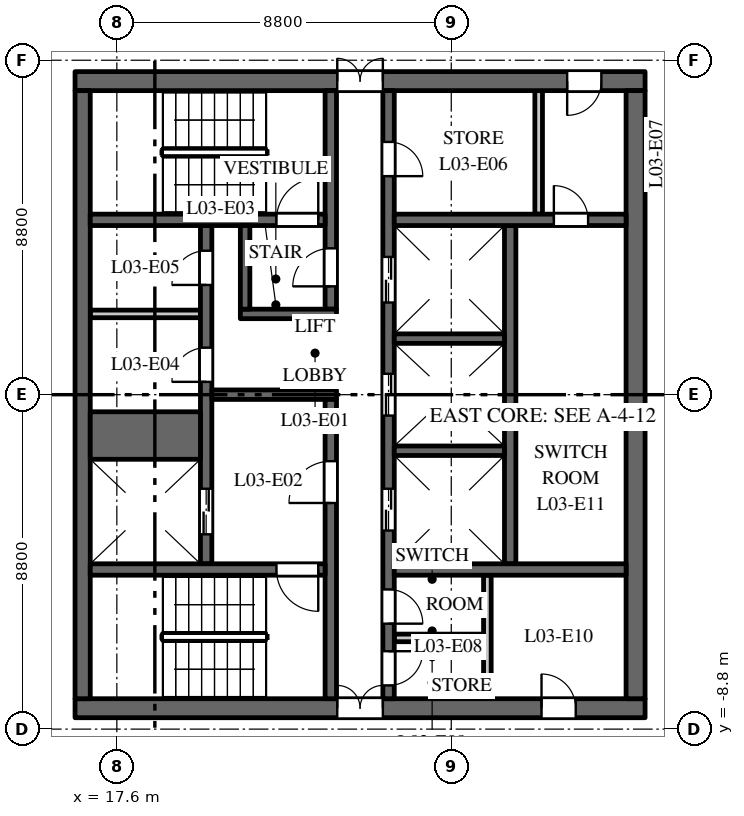
"""IFC4 building model, lengths in metres.
Left out: names, types, materials, properties, quantities, classifications, styles, units other than length and angle.
Written with IfcOpenShell. Run it as: python <this file> out.ifc"""

import sys

from ifc_helpers import new_model, si_unit, direction, frame, frame_2d, origin, place, context, subcontext, project, spatial, rectangle, extrude, element, fill, save


model = new_model("IFC4")
c1 = context("Model", 3, precision=1e-05, world=origin(), true_north=direction((0.0, 1.0)))
c2 = subcontext(c1, "Body", "Model", "MODEL_VIEW")
j1 = project(units=[si_unit("LENGTHUNIT", "METRE"), si_unit("PLANEANGLEUNIT", "RADIAN")], contexts=[c1])
p1 = place(None, origin())
s1 = spatial("IfcSite", under=j1, at=p1, CompositionType="ELEMENT")
p2 = place(p1, origin())
s2 = spatial("IfcBuilding", under=s1, at=p2, CompositionType="ELEMENT")
p3 = place(p2, frame((0.0, 0.0, 19.5)))
s3 = spatial("IfcBuildingStorey", under=s2, at=p3, CompositionType="ELEMENT", Elevation=19.5)
p4 = place(p3, frame((16.5, 8.25, 0.0), z_axis=(0.0, 0.0, 1.0), x_axis=(1.0, 0.0, 0.0)))
e1 = element("IfcWall", 1, at=p4, inside=s3, PredefinedType="SHEAR", context=c2, shape_type="SweptSolid", body=[
    extrude(rectangle(XDim=15.0, YDim=0.5, at=frame_2d((7.5, 0.0))), origin(), (0.0, 0.0, 1.0), 5.25),
])
p5 = place(p4, frame((6.9, 0.0, 0.0)))
e2 = element("IfcOpeningElement", 2, at=p5, cuts=e1, PredefinedType="OPENING", context=c2, shape_type="SweptSolid", body=[
    extrude(rectangle(XDim=1.2, YDim=2.1, at=frame_2d((0.6, 1.05))), frame((0.0, 0.26, 0.0), z_axis=(0.0, -1.0, 0.0), x_axis=(1.0, 0.0, 0.0)), (0.0, 0.0, 1.0), 0.52),
])
p6 = place(p4, frame((12.95, 0.0, 0.0)))
e3 = element("IfcOpeningElement", 3, at=p6, cuts=e1, PredefinedType="OPENING", context=c2, shape_type="SweptSolid", body=[
    extrude(rectangle(XDim=0.9, YDim=2.1, at=frame_2d((0.45, 1.05))), frame((0.0, 0.26, 0.0), z_axis=(0.0, -1.0, 0.0), x_axis=(1.0, 0.0, 0.0)), (0.0, 0.0, 1.0), 0.52),
])
p7 = place(p3, frame((16.5, -8.25, 0.0), z_axis=(0.0, 0.0, 1.0), x_axis=(1.0, 0.0, 0.0)))
e4 = element("IfcWall", 4, at=p7, inside=s3, PredefinedType="SHEAR", context=c2, shape_type="SweptSolid", body=[
    extrude(rectangle(XDim=15.0, YDim=0.5, at=frame_2d((7.5, 0.0))), origin(), (0.0, 0.0, 1.0), 5.25),
])
p8 = place(p7, frame((6.9, 0.0, 0.0)))
e5 = element("IfcOpeningElement", 5, at=p8, cuts=e4, PredefinedType="OPENING", context=c2, shape_type="SweptSolid", body=[
    extrude(rectangle(XDim=1.2, YDim=2.1, at=frame_2d((0.6, 1.05))), frame((0.0, 0.26, 0.0), z_axis=(0.0, -1.0, 0.0), x_axis=(1.0, 0.0, 0.0)), (0.0, 0.0, 1.0), 0.52),
])
p9 = place(p7, frame((12.275, 0.0, 0.0)))
e6 = element("IfcOpeningElement", 6, at=p9, cuts=e4, PredefinedType="OPENING", context=c2, shape_type="SweptSolid", body=[
    extrude(rectangle(XDim=0.9, YDim=2.1, at=frame_2d((0.45, 1.05))), frame((0.0, 0.26, 0.0), z_axis=(0.0, -1.0, 0.0), x_axis=(1.0, 0.0, 0.0)), (0.0, 0.0, 1.0), 0.52),
])
p10 = place(p3, frame((16.9, 2.125, 0.0), z_axis=(0.0, 0.0, 1.0), x_axis=(1.0, 0.0, 0.0)))
e7 = element("IfcWall", 7, at=p10, inside=s3, PredefinedType="PARTITIONING", context=c2, shape_type="SweptSolid", body=[
    extrude(rectangle(XDim=2.9, YDim=0.2, at=frame_2d((1.45, 0.0))), origin(), (0.0, 0.0, 1.0), 5.25),
])
p11 = place(p3, frame((27.95, -4.45, 0.0), z_axis=(0.0, 0.0, 1.0), x_axis=(0.0, 1.0, 0.0)))
e8 = element("IfcWall", 8, at=p11, inside=s3, PredefinedType="SHEAR", context=c2, shape_type="SweptSolid", body=[
    extrude(rectangle(XDim=8.9, YDim=0.3, at=frame_2d((4.45, 0.0))), origin(), (0.0, 0.0, 1.0), 5.25),
])
p12 = place(p3, frame((19.95, -4.45, 0.0), z_axis=(0.0, 0.0, 1.0), x_axis=(0.0, 1.0, 0.0)))
e9 = element("IfcWall", 9, at=p12, inside=s3, PredefinedType="SHEAR", context=c2, shape_type="SweptSolid", body=[
    extrude(rectangle(XDim=8.9, YDim=0.3, at=frame_2d((4.45, 0.0))), origin(), (0.0, 0.0, 1.0), 5.25),
])
p13 = place(p12, frame((0.775, 0.0, 0.0)))
e10 = element("IfcOpeningElement", 10, at=p13, cuts=e9, PredefinedType="OPENING", context=c2, shape_type="SweptSolid", body=[
    extrude(rectangle(XDim=1.2, YDim=2.1, at=frame_2d((0.6, 1.05))), frame((0.0, 0.16, 0.0), z_axis=(0.0, -1.0, 0.0), x_axis=(1.0, 0.0, 0.0)), (0.0, 0.0, 1.0), 0.32),
])
p14 = place(p12, frame((4.788, 0.0, 0.0)))
e11 = element("IfcOpeningElement", 11, at=p14, cuts=e9, PredefinedType="OPENING", context=c2, shape_type="SweptSolid", body=[
    extrude(rectangle(XDim=0.9, YDim=2.1, at=frame_2d((0.45, 1.05))), frame((0.0, 0.16, 0.0), z_axis=(0.0, -1.0, 0.0), x_axis=(1.0, 0.0, 0.0)), (0.0, 0.0, 1.0), 0.32),
])
p15 = place(p12, frame((7.337, 0.0, 0.0)))
e12 = element("IfcOpeningElement", 12, at=p15, cuts=e9, PredefinedType="OPENING", context=c2, shape_type="SweptSolid", body=[
    extrude(rectangle(XDim=0.9, YDim=2.1, at=frame_2d((0.45, 1.05))), frame((0.0, 0.16, 0.0), z_axis=(0.0, -1.0, 0.0), x_axis=(1.0, 0.0, 0.0)), (0.0, 0.0, 1.0), 0.32),
])
p16 = place(p3, frame((24.75, -8.0, 0.0), z_axis=(0.0, 0.0, 1.0), x_axis=(0.0, 1.0, 0.0)))
e13 = element("IfcWall", 13, at=p16, inside=s3, PredefinedType="SHEAR", context=c2, shape_type="SweptSolid", body=[
    extrude(rectangle(XDim=16.0, YDim=0.3, at=frame_2d((8.0, 0.0))), origin(), (0.0, 0.0, 1.0), 5.25),
])
p17 = place(p16, frame((4.425, 0.0, 0.0)))
e14 = element("IfcOpeningElement", 14, at=p17, cuts=e13, PredefinedType="OPENING", context=c2, shape_type="SweptSolid", body=[
    extrude(rectangle(XDim=1.1, YDim=2.1, at=frame_2d((0.55, 1.05))), frame((0.0, 0.16, 0.0), z_axis=(0.0, -1.0, 0.0), x_axis=(1.0, 0.0, 0.0)), (0.0, 0.0, 1.0), 0.32),
])
p18 = place(p16, frame((7.45, 0.0, 0.0)))
e15 = element("IfcOpeningElement", 15, at=p18, cuts=e13, PredefinedType="OPENING", context=c2, shape_type="SweptSolid", body=[
    extrude(rectangle(XDim=1.1, YDim=2.1, at=frame_2d((0.55, 1.05))), frame((0.0, 0.16, 0.0), z_axis=(0.0, -1.0, 0.0), x_axis=(1.0, 0.0, 0.0)), (0.0, 0.0, 1.0), 0.32),
])
p19 = place(p16, frame((10.425, 0.0, 0.0)))
e16 = element("IfcOpeningElement", 16, at=p19, cuts=e13, PredefinedType="OPENING", context=c2, shape_type="SweptSolid", body=[
    extrude(rectangle(XDim=1.2, YDim=2.1, at=frame_2d((0.6, 1.05))), frame((0.0, 0.16, 0.0), z_axis=(0.0, -1.0, 0.0), x_axis=(1.0, 0.0, 0.0)), (0.0, 0.0, 1.0), 0.32),
])
p20 = place(p16, frame((13.75, 0.0, 0.0)))
e17 = element("IfcOpeningElement", 17, at=p20, cuts=e13, PredefinedType="OPENING", context=c2, shape_type="SweptSolid", body=[
    extrude(rectangle(XDim=0.9, YDim=2.1, at=frame_2d((0.45, 1.05))), frame((0.0, 0.16, 0.0), z_axis=(0.0, -1.0, 0.0), x_axis=(1.0, 0.0, 0.0)), (0.0, 0.0, 1.0), 0.32),
])
p21 = place(p16, frame((1.975, 0.0, 0.0)))
e18 = element("IfcOpeningElement", 18, at=p21, cuts=e13, PredefinedType="OPENING", context=c2, shape_type="SweptSolid", body=[
    extrude(rectangle(XDim=0.9, YDim=2.1, at=frame_2d((0.45, 1.05))), frame((0.0, 0.16, 0.0), z_axis=(0.0, -1.0, 0.0), x_axis=(1.0, 0.0, 0.0)), (0.0, 0.0, 1.0), 0.32),
])
p22 = place(p16, frame((0.35, 0.0, 0.0)))
e19 = element("IfcOpeningElement", 19, at=p22, cuts=e13, PredefinedType="OPENING", context=c2, shape_type="SweptSolid", body=[
    extrude(rectangle(XDim=0.9, YDim=2.1, at=frame_2d((0.45, 1.05))), frame((0.0, 0.16, 0.0), z_axis=(0.0, -1.0, 0.0), x_axis=(1.0, 0.0, 0.0)), (0.0, 0.0, 1.0), 0.32),
])
p23 = place(p3, frame((20.1, 0.0, 0.0), z_axis=(0.0, 0.0, 1.0), x_axis=(1.0, 0.0, 0.0)))
e20 = element("IfcWall", 20, at=p23, inside=s3, PredefinedType="SHEAR", context=c2, shape_type="SweptSolid", body=[
    extrude(rectangle(XDim=3.28, YDim=0.25, at=frame_2d((1.64, 0.0))), origin(), (0.0, 0.0, 1.0), 5.25),
])
p24 = place(p3, frame((16.7, -8.0, 0.0), z_axis=(0.0, 0.0, 1.0), x_axis=(0.0, 1.0, 0.0)))
e21 = element("IfcWall", 21, at=p24, inside=s3, PredefinedType="SHEAR", context=c2, shape_type="SweptSolid", body=[
    extrude(rectangle(XDim=16.0, YDim=0.4, at=frame_2d((8.0, 0.0))), origin(), (0.0, 0.0, 1.0), 5.25),
])
p25 = place(p3, frame((31.25, -8.0, 0.0), z_axis=(0.0, 0.0, 1.0), x_axis=(0.0, 1.0, 0.0)))
e22 = element("IfcWall", 22, at=p25, inside=s3, PredefinedType="SHEAR", context=c2, shape_type="SweptSolid", body=[
    extrude(rectangle(XDim=16.0, YDim=0.5, at=frame_2d((8.0, 0.0))), origin(), (0.0, 0.0, 1.0), 5.25),
])
p26 = place(p3, frame((24.9, 4.6, 0.0), z_axis=(0.0, 0.0, 1.0), x_axis=(1.0, 0.0, 0.0)))
e23 = element("IfcWall", 23, at=p26, inside=s3, PredefinedType="SHEAR", context=c2, shape_type="SweptSolid", body=[
    extrude(rectangle(XDim=6.1, YDim=0.3, at=frame_2d((3.05, 0.0))), origin(), (0.0, 0.0, 1.0), 5.25),
])
p27 = place(p26, frame((4.2, 0.0, 0.0)))
e24 = element("IfcOpeningElement", 24, at=p27, cuts=e23, PredefinedType="OPENING", context=c2, shape_type="SweptSolid", body=[
    extrude(rectangle(XDim=0.9, YDim=2.1, at=frame_2d((0.45, 1.05))), frame((0.0, 0.16, 0.0), z_axis=(0.0, -1.0, 0.0), x_axis=(1.0, 0.0, 0.0)), (0.0, 0.0, 1.0), 0.32),
])
for number, where, z_axis, x_axis in (
    (25, (28.7, 4.75, 0.0), (0.0, 0.0, 1.0), (0.0, 1.0, 0.0)),
    (26, (27.35, -8.0, 0.0), (0.0, 0.0, 1.0), (0.0, 1.0, 0.0)),
):
    element("IfcWall", number, at=place(p3, frame(where, z_axis=z_axis, x_axis=x_axis)), inside=s3, PredefinedType="PARTITIONING", context=c2, shape_type="SweptSolid", body=[
        extrude(rectangle(XDim=3.25, YDim=0.2, at=frame_2d((1.625, 0.0))), origin(), (0.0, 0.0, 1.0), 5.25),
    ])
p28 = place(p3, frame((24.9, -6.4, 0.0), z_axis=(0.0, 0.0, 1.0), x_axis=(1.0, 0.0, 0.0)))
e27 = element("IfcWall", 27, at=p28, inside=s3, PredefinedType="PARTITIONING", context=c2, shape_type="SweptSolid", body=[
    extrude(rectangle(XDim=2.35, YDim=0.2, at=frame_2d((1.175, 0.0))), origin(), (0.0, 0.0, 1.0), 5.25),
])
p29 = place(p3, frame((24.9, -4.6, 0.0), z_axis=(0.0, 0.0, 1.0), x_axis=(1.0, 0.0, 0.0)))
e28 = element("IfcWall", 28, at=p29, inside=s3, PredefinedType="SHEAR", context=c2, shape_type="SweptSolid", body=[
    extrude(rectangle(XDim=6.1, YDim=0.3, at=frame_2d((3.05, 0.0))), origin(), (0.0, 0.0, 1.0), 5.25),
])
p30 = place(p3, frame((16.9, -1.075, 0.0), z_axis=(0.0, 0.0, 1.0), x_axis=(1.0, 0.0, 0.0)))
e29 = element("IfcWall", 29, at=p30, inside=s3, PredefinedType="SHEAR", context=c2, shape_type="SweptSolid", body=[
    extrude(rectangle(XDim=2.9, YDim=1.25, at=frame_2d((1.45, 0.0))), origin(), (0.0, 0.0, 1.0), 5.25),
])
for number, where, z_axis, x_axis in (
    (30, (24.9, -1.475, 0.0), (0.0, 0.0, 1.0), (1.0, 0.0, 0.0)),
    (31, (24.9, 1.475, 0.0), (0.0, 0.0, 1.0), (1.0, 0.0, 0.0)),
):
    element("IfcWall", number, at=place(p3, frame(where, z_axis=z_axis, x_axis=x_axis)), inside=s3, PredefinedType="SHEAR", context=c2, shape_type="SweptSolid", body=[
        extrude(rectangle(XDim=2.9, YDim=0.25, at=frame_2d((1.45, 0.0))), origin(), (0.0, 0.0, 1.0), 5.25),
    ])
p31 = place(p3, frame((23.23, 2.25, 0.0), z_axis=(0.0, 0.0, 1.0), x_axis=(0.0, 1.0, 0.0)))
e32 = element("IfcWall", 32, at=p31, inside=s3, PredefinedType="SHEAR", context=c2, shape_type="SweptSolid", body=[
    extrude(rectangle(XDim=5.75, YDim=0.3, at=frame_2d((2.875, 0.0))), origin(), (0.0, 0.0, 1.0), 5.25),
])
p32 = place(p31, frame((0.6, 0.0, 0.0)))
e33 = element("IfcOpeningElement", 33, at=p32, cuts=e32, PredefinedType="OPENING", context=c2, shape_type="SweptSolid", body=[
    extrude(rectangle(XDim=1.0, YDim=2.1, at=frame_2d((0.5, 1.05))), frame((0.0, 0.16, 0.0), z_axis=(0.0, -1.0, 0.0), x_axis=(1.0, 0.0, 0.0)), (0.0, 0.0, 1.0), 0.32),
])
p33 = place(p3, frame((23.23, -8.0, 0.0), z_axis=(0.0, 0.0, 1.0), x_axis=(0.0, 1.0, 0.0)))
e34 = element("IfcWall", 34, at=p33, inside=s3, PredefinedType="SHEAR", context=c2, shape_type="SweptSolid", body=[
    extrude(rectangle(XDim=7.875, YDim=0.3, at=frame_2d((3.938, 0.0))), origin(), (0.0, 0.0, 1.0), 5.25),
])
p34 = place(p33, frame((5.15, 0.0, 0.0)))
e35 = element("IfcOpeningElement", 35, at=p34, cuts=e34, PredefinedType="OPENING", context=c2, shape_type="SweptSolid", body=[
    extrude(rectangle(XDim=1.1, YDim=2.1, at=frame_2d((0.55, 1.05))), frame((0.0, 0.16, 0.0), z_axis=(0.0, -1.0, 0.0), x_axis=(1.0, 0.0, 0.0)), (0.0, 0.0, 1.0), 0.32),
])
p35 = place(p3, frame((16.9, 4.6, 0.0), z_axis=(0.0, 0.0, 1.0), x_axis=(1.0, 0.0, 0.0)))
e36 = element("IfcWall", 36, at=p35, inside=s3, PredefinedType="SHEAR", context=c2, shape_type="SweptSolid", body=[
    extrude(rectangle(XDim=6.18, YDim=0.3, at=frame_2d((3.09, 0.0))), origin(), (0.0, 0.0, 1.0), 5.25),
])
p36 = place(p35, frame((4.9, 0.0, 0.0)))
e37 = element("IfcOpeningElement", 37, at=p36, cuts=e36, PredefinedType="OPENING", context=c2, shape_type="SweptSolid", body=[
    extrude(rectangle(XDim=1.1, YDim=2.1, at=frame_2d((0.55, 1.05))), frame((0.0, 0.16, 0.0), z_axis=(0.0, -1.0, 0.0), x_axis=(1.0, 0.0, 0.0)), (0.0, 0.0, 1.0), 0.32),
])
p37 = place(p3, frame((16.9, -4.6, 0.0), z_axis=(0.0, 0.0, 1.0), x_axis=(1.0, 0.0, 0.0)))
e38 = element("IfcWall", 38, at=p37, inside=s3, PredefinedType="SHEAR", context=c2, shape_type="SweptSolid", body=[
    extrude(rectangle(XDim=6.18, YDim=0.3, at=frame_2d((3.09, 0.0))), origin(), (0.0, 0.0, 1.0), 5.25),
])
p38 = place(p37, frame((4.9, 0.0, 0.0)))
e39 = element("IfcOpeningElement", 39, at=p38, cuts=e38, PredefinedType="OPENING", context=c2, shape_type="SweptSolid", body=[
    extrude(rectangle(XDim=1.1, YDim=2.1, at=frame_2d((0.55, 1.05))), frame((0.0, 0.16, 0.0), z_axis=(0.0, -1.0, 0.0), x_axis=(1.0, 0.0, 0.0)), (0.0, 0.0, 1.0), 0.32),
])
p39 = place(p3, frame((20.85, 2.125, 0.0), z_axis=(0.0, 0.0, 1.0), x_axis=(1.0, 0.0, 0.0)))
e40 = element("IfcWall", 40, at=p39, inside=s3, PredefinedType="SHEAR", context=c2, shape_type="SweptSolid", body=[
    extrude(rectangle(XDim=2.53, YDim=0.25, at=frame_2d((1.265, 0.0))), origin(), (0.0, 0.0, 1.0), 5.25),
])
p40 = place(p3, frame((20.975, 2.25, 0.0), z_axis=(0.0, 0.0, 1.0), x_axis=(0.0, 1.0, 0.0)))
e41 = element("IfcWall", 41, at=p40, inside=s3, PredefinedType="SHEAR", context=c2, shape_type="SweptSolid", body=[
    extrude(rectangle(XDim=2.2, YDim=0.25, at=frame_2d((1.1, 0.0))), origin(), (0.0, 0.0, 1.0), 5.25),
])
p41 = place(p13, origin())
e42 = element("IfcDoor", 42, at=p41, inside=s3, OperationType="DOUBLE_DOOR_SLIDING", PredefinedType="DOOR", context=c2, shape_type="SweptSolid", body=[
    extrude(rectangle(XDim=1.2, YDim=2.1, at=frame_2d((0.6, 1.05))), frame((0.0, 0.025, 0.0), z_axis=(0.0, -1.0, 0.0), x_axis=(1.0, 0.0, 0.0)), (0.0, 0.0, 1.0), 0.05),
])
fill(e10, e42)
p42 = place(p17, origin())
e43 = element("IfcDoor", 43, at=p42, inside=s3, OperationType="DOUBLE_DOOR_SLIDING", PredefinedType="DOOR", context=c2, shape_type="SweptSolid", body=[
    extrude(rectangle(XDim=1.1, YDim=2.1, at=frame_2d((0.55, 1.05))), frame((0.0, 0.025, 0.0), z_axis=(0.0, -1.0, 0.0), x_axis=(1.0, 0.0, 0.0)), (0.0, 0.0, 1.0), 0.05),
])
fill(e14, e43)
p43 = place(p18, origin())
e44 = element("IfcDoor", 44, at=p43, inside=s3, OperationType="DOUBLE_DOOR_SLIDING", PredefinedType="DOOR", context=c2, shape_type="SweptSolid", body=[
    extrude(rectangle(XDim=1.1, YDim=2.1, at=frame_2d((0.55, 1.05))), frame((0.0, 0.025, 0.0), z_axis=(0.0, -1.0, 0.0), x_axis=(1.0, 0.0, 0.0)), (0.0, 0.0, 1.0), 0.05),
])
fill(e15, e44)
p44 = place(p19, origin())
e45 = element("IfcDoor", 45, at=p44, inside=s3, OperationType="DOUBLE_DOOR_SLIDING", PredefinedType="DOOR", context=c2, shape_type="SweptSolid", body=[
    extrude(rectangle(XDim=1.2, YDim=2.1, at=frame_2d((0.6, 1.05))), frame((0.0, 0.025, 0.0), z_axis=(0.0, -1.0, 0.0), x_axis=(1.0, 0.0, 0.0)), (0.0, 0.0, 1.0), 0.05),
])
fill(e16, e45)
p45 = place(p36, origin())
e46 = element("IfcDoor", 46, at=p45, inside=s3, OperationType="SINGLE_SWING_LEFT", PredefinedType="DOOR", context=c2, shape_type="SweptSolid", body=[
    extrude(rectangle(XDim=1.1, YDim=2.1, at=frame_2d((0.55, 1.05))), frame((0.0, 0.025, 0.0), z_axis=(0.0, -1.0, 0.0), x_axis=(1.0, 0.0, 0.0)), (0.0, 0.0, 1.0), 0.05),
])
fill(e37, e46)
p46 = place(p38, origin())
e47 = element("IfcDoor", 47, at=p46, inside=s3, OperationType="SINGLE_SWING_RIGHT", PredefinedType="DOOR", context=c2, shape_type="SweptSolid", body=[
    extrude(rectangle(XDim=1.1, YDim=2.1, at=frame_2d((0.55, 1.05))), frame((0.0, 0.025, 0.0), z_axis=(0.0, -1.0, 0.0), x_axis=(1.0, 0.0, 0.0)), (0.0, 0.0, 1.0), 0.05),
])
fill(e39, e47)
p47 = place(p34, origin())
e48 = element("IfcDoor", 48, at=p47, inside=s3, OperationType="SINGLE_SWING_RIGHT", PredefinedType="DOOR", context=c2, shape_type="SweptSolid", body=[
    extrude(rectangle(XDim=1.1, YDim=2.1, at=frame_2d((0.55, 1.05))), frame((0.0, 0.025, 0.0), z_axis=(0.0, -1.0, 0.0), x_axis=(1.0, 0.0, 0.0)), (0.0, 0.0, 1.0), 0.05),
])
fill(e35, e48)
p48 = place(p32, origin())
e49 = element("IfcDoor", 49, at=p48, inside=s3, OperationType="SINGLE_SWING_RIGHT", PredefinedType="DOOR", context=c2, shape_type="SweptSolid", body=[
    extrude(rectangle(XDim=1.0, YDim=2.1, at=frame_2d((0.5, 1.05))), frame((0.0, 0.025, 0.0), z_axis=(0.0, -1.0, 0.0), x_axis=(1.0, 0.0, 0.0)), (0.0, 0.0, 1.0), 0.05),
])
fill(e33, e49)
p49 = place(p5, origin())
e50 = element("IfcDoor", 50, at=p49, inside=s3, OperationType="DOUBLE_DOOR_DOUBLE_SWING", PredefinedType="DOOR", context=c2, shape_type="SweptSolid", body=[
    extrude(rectangle(XDim=1.2, YDim=2.1, at=frame_2d((0.6, 1.05))), frame((0.0, 0.025, 0.0), z_axis=(0.0, -1.0, 0.0), x_axis=(1.0, 0.0, 0.0)), (0.0, 0.0, 1.0), 0.05),
])
fill(e2, e50)
p50 = place(p8, origin())
e51 = element("IfcDoor", 51, at=p50, inside=s3, OperationType="DOUBLE_DOOR_DOUBLE_SWING", PredefinedType="DOOR", context=c2, shape_type="SweptSolid", body=[
    extrude(rectangle(XDim=1.2, YDim=2.1, at=frame_2d((0.6, 1.05))), frame((0.0, 0.025, 0.0), z_axis=(0.0, -1.0, 0.0), x_axis=(1.0, 0.0, 0.0)), (0.0, 0.0, 1.0), 0.05),
])
fill(e5, e51)
p51 = place(p14, origin())
e52 = element("IfcDoor", 52, at=p51, inside=s3, OperationType="SINGLE_SWING_RIGHT", PredefinedType="DOOR", context=c2, shape_type="SweptSolid", body=[
    extrude(rectangle(XDim=0.9, YDim=2.1, at=frame_2d((0.45, 1.05))), frame((0.0, 0.025, 0.0), z_axis=(0.0, -1.0, 0.0), x_axis=(1.0, 0.0, 0.0)), (0.0, 0.0, 1.0), 0.05),
])
fill(e11, e52)
p52 = place(p15, origin())
e53 = element("IfcDoor", 53, at=p52, inside=s3, OperationType="SINGLE_SWING_RIGHT", PredefinedType="DOOR", context=c2, shape_type="SweptSolid", body=[
    extrude(rectangle(XDim=0.9, YDim=2.1, at=frame_2d((0.45, 1.05))), frame((0.0, 0.025, 0.0), z_axis=(0.0, -1.0, 0.0), x_axis=(1.0, 0.0, 0.0)), (0.0, 0.0, 1.0), 0.05),
])
fill(e12, e53)
p53 = place(p20, origin())
e54 = element("IfcDoor", 54, at=p53, inside=s3, OperationType="SINGLE_SWING_LEFT", PredefinedType="DOOR", context=c2, shape_type="SweptSolid", body=[
    extrude(rectangle(XDim=0.9, YDim=2.1, at=frame_2d((0.45, 1.05))), frame((0.0, 0.025, 0.0), z_axis=(0.0, -1.0, 0.0), x_axis=(1.0, 0.0, 0.0)), (0.0, 0.0, 1.0), 0.05),
])
fill(e17, e54)
p54 = place(p6, origin())
e55 = element("IfcDoor", 55, at=p54, inside=s3, OperationType="SINGLE_SWING_LEFT", PredefinedType="DOOR", context=c2, shape_type="SweptSolid", body=[
    extrude(rectangle(XDim=0.9, YDim=2.1, at=frame_2d((0.45, 1.05))), frame((0.0, 0.025, 0.0), z_axis=(0.0, -1.0, 0.0), x_axis=(1.0, 0.0, 0.0)), (0.0, 0.0, 1.0), 0.05),
])
fill(e3, e55)
p55 = place(p21, origin())
e56 = element("IfcDoor", 56, at=p55, inside=s3, OperationType="SINGLE_SWING_LEFT", PredefinedType="DOOR", context=c2, shape_type="SweptSolid", body=[
    extrude(rectangle(XDim=0.9, YDim=2.1, at=frame_2d((0.45, 1.05))), frame((0.0, 0.025, 0.0), z_axis=(0.0, -1.0, 0.0), x_axis=(1.0, 0.0, 0.0)), (0.0, 0.0, 1.0), 0.05),
])
fill(e18, e56)
p56 = place(p22, origin())
e57 = element("IfcDoor", 57, at=p56, inside=s3, OperationType="SINGLE_SWING_RIGHT", PredefinedType="DOOR", context=c2, shape_type="SweptSolid", body=[
    extrude(rectangle(XDim=0.9, YDim=2.1, at=frame_2d((0.45, 1.05))), frame((0.0, 0.025, 0.0), z_axis=(0.0, -1.0, 0.0), x_axis=(1.0, 0.0, 0.0)), (0.0, 0.0, 1.0), 0.05),
])
fill(e19, e57)
p57 = place(p9, origin())
e58 = element("IfcDoor", 58, at=p57, inside=s3, OperationType="SINGLE_SWING_RIGHT", PredefinedType="DOOR", context=c2, shape_type="SweptSolid", body=[
    extrude(rectangle(XDim=0.9, YDim=2.1, at=frame_2d((0.45, 1.05))), frame((0.0, 0.025, 0.0), z_axis=(0.0, -1.0, 0.0), x_axis=(1.0, 0.0, 0.0)), (0.0, 0.0, 1.0), 0.05),
])
fill(e6, e58)
p58 = place(p27, origin())
e59 = element("IfcDoor", 59, at=p58, inside=s3, OperationType="SINGLE_SWING_RIGHT", PredefinedType="DOOR", context=c2, shape_type="SweptSolid", body=[
    extrude(rectangle(XDim=0.9, YDim=2.1, at=frame_2d((0.45, 1.05))), frame((0.0, 0.025, 0.0), z_axis=(0.0, -1.0, 0.0), x_axis=(1.0, 0.0, 0.0)), (0.0, 0.0, 1.0), 0.05),
])
fill(e24, e59)
save(model, sys.argv[1])
